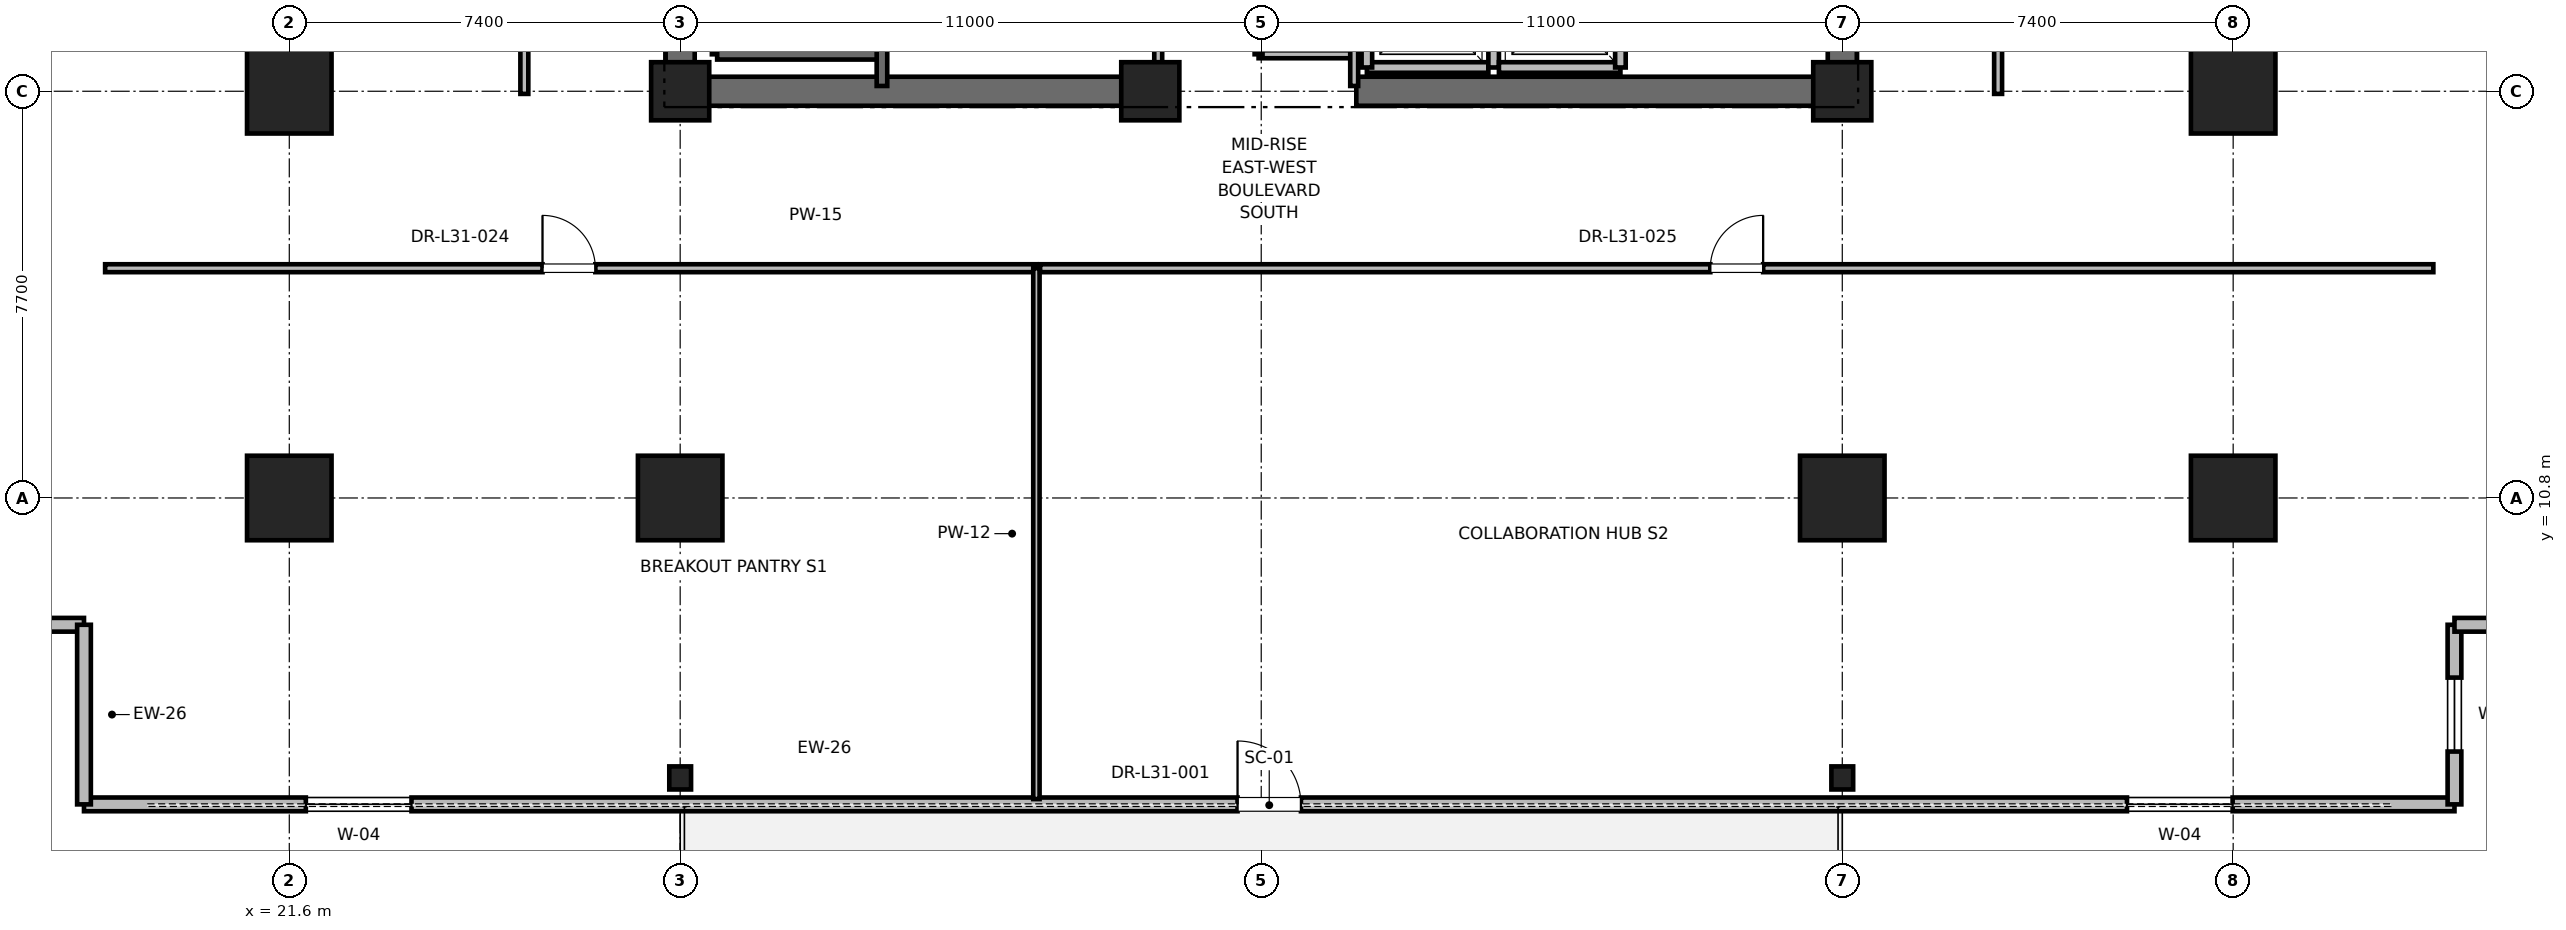
"""IFC4 building model, lengths in metres.
Left out: names, types, materials, properties, quantities, classifications, styles, units other than length and angle.
Written with IfcOpenShell. Run it as: python <this file> out.ifc"""

import sys

from ifc_helpers import new_model, si_unit, direction, frame, frame_2d, origin, origin_2d, place, context, subcontext, project, spatial, rectangle, i_section, extrude, element, fill, save


model = new_model("IFC4")
c1 = context("Model", 3, precision=1e-05, world=origin(), true_north=direction((0.0, 1.0)))
c2 = subcontext(c1, "Body", "Model", "MODEL_VIEW")
j1 = project(units=[si_unit("LENGTHUNIT", "METRE"), si_unit("PLANEANGLEUNIT", "RADIAN")], contexts=[c1])
p1 = place(None, origin())
s1 = spatial("IfcSite", under=j1, at=p1, CompositionType="ELEMENT")
p2 = place(p1, origin())
s2 = spatial("IfcBuilding", under=s1, at=p2, CompositionType="ELEMENT")
p3 = place(p2, frame((0.0, 0.0, 136.4)))
s3 = spatial("IfcBuildingStorey", under=s2, at=p3, CompositionType="ELEMENT", Elevation=136.4)
for number, where, z_axis, x_axis in (
    (1, (29.0, 10.8, 0.0), (0.0, 0.0, 1.0), (1.0, 0.0, 0.0)),
    (2, (51.0, 10.8, 0.0), (0.0, 0.0, 1.0), (1.0, 0.0, 0.0)),
    (3, (21.6, 18.5, 0.0), (0.0, 0.0, 1.0), (1.0, 0.0, 0.0)),
    (4, (58.4, 18.5, 0.0), (0.0, 0.0, 1.0), (1.0, 0.0, 0.0)),
    (5, (21.6, 10.8, 0.0), (0.0, 0.0, 1.0), (1.0, 0.0, 0.0)),
    (6, (58.4, 10.8, 0.0), (0.0, 0.0, 1.0), (1.0, 0.0, 0.0)),
):
    element("IfcColumn", number, at=place(p3, frame(where, z_axis=z_axis, x_axis=x_axis)), inside=s3, PredefinedType="COLUMN", context=c2, shape_type="SweptSolid", body=[
        extrude(rectangle(XDim=1.6, YDim=1.6, at=origin_2d()), origin(), (0.0, 0.0, 1.0), 4.0),
    ])
for number, where, z_axis, x_axis in (
    (7, (29.0, 5.5, 0.0), (0.0, 0.0, 1.0), (1.0, 0.0, 0.0)),
    (8, (51.0, 5.5, 0.0), (0.0, 0.0, 1.0), (1.0, 0.0, 0.0)),
):
    element("IfcColumn", number, at=place(p3, frame(where, z_axis=z_axis, x_axis=x_axis)), inside=s3, PredefinedType="COLUMN", context=c2, shape_type="SweptSolid", body=[
        extrude(i_section(OverallWidth=0.412, OverallDepth=0.437, WebThickness=0.036, FlangeThickness=0.058, FilletRadius=0.015, at=origin_2d()), origin(), (0.0, 0.0, 1.0), 4.0),
    ])
for number, where, z_axis, x_axis in (
    (9, (29.0, 18.5, 0.0), (0.0, 0.0, 1.0), (1.0, 0.0, 0.0)),
    (10, (51.0, 18.5, 0.0), (0.0, 0.0, 1.0), (1.0, 0.0, 0.0)),
    (11, (37.9, 18.5, 0.0), (0.0, 0.0, 1.0), (1.0, 0.0, 0.0)),
):
    element("IfcColumn", number, at=place(p3, frame(where, z_axis=z_axis, x_axis=x_axis)), inside=s3, PredefinedType="PILASTER", context=c2, shape_type="SweptSolid", body=[
        extrude(rectangle(XDim=1.1, YDim=1.1, at=origin_2d()), origin(), (0.0, 0.0, 1.0), 4.0),
    ])
for number, where, z_axis, x_axis in (
    (12, (29.0, 18.5, 0.0), (0.0, 0.0, 1.0), (1.0, 0.0, 0.0)),
    (13, (41.8, 18.5, 0.0), (0.0, 0.0, 1.0), (1.0, 0.0, 0.0)),
):
    element("IfcWall", number, at=place(p3, frame(where, z_axis=z_axis, x_axis=x_axis)), inside=s3, PredefinedType="SHEAR", context=c2, shape_type="SweptSolid", body=[
        extrude(rectangle(XDim=9.2, YDim=0.55, at=frame_2d((4.6, 0.0))), origin(), (0.0, 0.0, 1.0), 3.775),
    ])
p4 = place(p3, frame((29.0, 18.5, 0.0), z_axis=(0.0, 0.0, 1.0), x_axis=(0.0, 1.0, 0.0)))
e14 = element("IfcWall", 14, at=p4, inside=s3, PredefinedType="SHEAR", context=c2, shape_type="SweptSolid", body=[
    extrude(rectangle(XDim=8.8, YDim=0.55, at=frame_2d((4.4, 0.0))), origin(), (0.0, 0.0, 1.0), 3.775),
])
p5 = place(p3, frame((51.0, 18.5, 0.0), z_axis=(0.0, 0.0, 1.0), x_axis=(0.0, 1.0, 0.0)))
e15 = element("IfcWall", 15, at=p5, inside=s3, PredefinedType="SHEAR", context=c2, shape_type="SweptSolid", body=[
    extrude(rectangle(XDim=5.8, YDim=0.55, at=frame_2d((2.9, 0.0))), origin(), (0.0, 0.0, 1.0), 3.775),
])
p6 = place(p3, frame((17.714, 5.0, 0.0), z_axis=(0.0, 0.0, 1.0), x_axis=(1.0, 0.0, 0.0)))
e16 = element("IfcWall", 16, at=p6, inside=s3, PredefinedType="PARAPET", context=c2, shape_type="SweptSolid", body=[
    extrude(rectangle(XDim=44.876, YDim=0.26, at=frame_2d((22.438, 0.0))), origin(), (0.0, 0.0, 1.0), 2.97),
])
p7 = place(p6, frame((4.2, 0.0, 0.85)))
e17 = element("IfcOpeningElement", 17, at=p7, cuts=e16, PredefinedType="OPENING", context=c2, shape_type="SweptSolid", body=[
    extrude(rectangle(XDim=2.0, YDim=2.3, at=frame_2d((1.0, 1.15))), frame((0.0, 0.13, 0.0), z_axis=(0.0, -1.0, 0.0), x_axis=(1.0, 0.0, 0.0)), (0.0, 0.0, 1.0), 0.26),
])
p8 = place(p6, frame((21.838, 0.0, 0.0)))
e18 = element("IfcOpeningElement", 18, at=p8, cuts=e16, PredefinedType="OPENING", context=c2, shape_type="SweptSolid", body=[
    extrude(rectangle(XDim=1.2, YDim=2.2, at=frame_2d((0.6, 1.1))), frame((0.0, 0.13, 0.0), z_axis=(0.0, -1.0, 0.0), x_axis=(1.0, 0.0, 0.0)), (0.0, 0.0, 1.0), 0.26),
])
p9 = place(p6, frame((38.676, 0.0, 0.85)))
e19 = element("IfcOpeningElement", 19, at=p9, cuts=e16, PredefinedType="OPENING", context=c2, shape_type="SweptSolid", body=[
    extrude(rectangle(XDim=2.0, YDim=2.3, at=frame_2d((1.0, 1.15))), frame((0.0, 0.13, 0.0), z_axis=(0.0, -1.0, 0.0), x_axis=(1.0, 0.0, 0.0)), (0.0, 0.0, 1.0), 0.26),
])
p10 = place(p3, frame((13.914, 8.399, 0.0), z_axis=(0.0, 0.0, 1.0), x_axis=(1.0, 0.0, 0.0)))
e20 = element("IfcWall", 20, at=p10, inside=s3, PredefinedType="PARAPET", context=c2, shape_type="SweptSolid", body=[
    extrude(rectangle(XDim=3.8, YDim=0.26, at=frame_2d((1.9, 0.0))), origin(), (0.0, 0.0, 1.0), 3.775),
])
p11 = place(p10, frame((1.2, 0.0, 0.85)))
e21 = element("IfcOpeningElement", 21, at=p11, cuts=e20, PredefinedType="OPENING", context=c2, shape_type="SweptSolid", body=[
    extrude(rectangle(XDim=1.4, YDim=2.0, at=frame_2d((0.7, 1.0))), frame((0.0, 0.13, 0.0), z_axis=(0.0, -1.0, 0.0), x_axis=(1.0, 0.0, 0.0)), (0.0, 0.0, 1.0), 0.26),
])
p12 = place(p3, frame((17.714, 8.399, 0.0), z_axis=(0.0, 0.0, 1.0), x_axis=(0.0, -1.0, 0.0)))
e22 = element("IfcWall", 22, at=p12, inside=s3, PredefinedType="PARAPET", context=c2, shape_type="SweptSolid", body=[
    extrude(rectangle(XDim=3.4, YDim=0.26, at=frame_2d((1.7, 0.0))), origin(), (0.0, 0.0, 1.0), 3.775),
])
p13 = place(p3, frame((62.59, 5.0, 0.0), z_axis=(0.0, 0.0, 1.0), x_axis=(0.0, 1.0, 0.0)))
e23 = element("IfcWall", 23, at=p13, inside=s3, PredefinedType="PARAPET", context=c2, shape_type="SweptSolid", body=[
    extrude(rectangle(XDim=3.4, YDim=0.26, at=frame_2d((1.7, 0.0))), origin(), (0.0, 0.0, 1.0), 3.775),
])
p14 = place(p13, frame((1.0, 0.0, 0.85)))
e24 = element("IfcOpeningElement", 24, at=p14, cuts=e23, PredefinedType="OPENING", context=c2, shape_type="SweptSolid", body=[
    extrude(rectangle(XDim=1.4, YDim=2.0, at=frame_2d((0.7, 1.0))), frame((0.0, 0.13, 0.0), z_axis=(0.0, -1.0, 0.0), x_axis=(1.0, 0.0, 0.0)), (0.0, 0.0, 1.0), 0.26),
])
p15 = place(p3, frame((62.59, 8.399, 0.0), z_axis=(0.0, 0.0, 1.0), x_axis=(1.0, 0.0, 0.0)))
e25 = element("IfcWall", 25, at=p15, inside=s3, PredefinedType="PARAPET", context=c2, shape_type="SweptSolid", body=[
    extrude(rectangle(XDim=3.8, YDim=0.26, at=frame_2d((1.9, 0.0))), origin(), (0.0, 0.0, 1.0), 3.775),
])
p16 = place(p3, frame((29.7, 19.2, 0.0), z_axis=(0.0, 0.0, 1.0), x_axis=(0.0, 1.0, 0.0)))
e26 = element("IfcWall", 26, at=p16, inside=s3, PredefinedType="SOLIDWALL", context=c2, shape_type="SweptSolid", body=[
    extrude(rectangle(XDim=8.15, YDim=0.2, at=frame_2d((4.075, 0.0))), origin(), (0.0, 0.0, 1.0), 3.775),
])
p17 = place(p3, frame((29.7, 19.2, 0.0), z_axis=(0.0, 0.0, 1.0), x_axis=(1.0, 0.0, 0.0)))
e27 = element("IfcWall", 27, at=p17, inside=s3, PredefinedType="SOLIDWALL", context=c2, shape_type="SweptSolid", body=[
    extrude(rectangle(XDim=3.12, YDim=0.2, at=frame_2d((1.56, 0.0))), origin(), (0.0, 0.0, 1.0), 3.775),
])
p18 = place(p3, frame((32.82, 18.6, 0.0), z_axis=(0.0, 0.0, 1.0), x_axis=(0.0, 1.0, 0.0)))
e28 = element("IfcWall", 28, at=p18, inside=s3, PredefinedType="SOLIDWALL", context=c2, shape_type="SweptSolid", body=[
    extrude(rectangle(XDim=8.78, YDim=0.2, at=frame_2d((4.39, 0.0))), origin(), (0.0, 0.0, 1.0), 3.775),
])
p19 = place(p3, frame((42.0, 18.95, 0.0), z_axis=(0.0, 0.0, 1.0), x_axis=(1.0, 0.0, 0.0)))
e29 = element("IfcWall", 29, at=p19, inside=s3, PredefinedType="SOLIDWALL", context=c2, shape_type="SweptSolid", body=[
    extrude(rectangle(XDim=2.3, YDim=0.2, at=frame_2d((1.15, 0.0))), origin(), (0.0, 0.0, 1.0), 2.755),
])
p20 = place(p3, frame((42.0, 21.55, 0.0), z_axis=(0.0, 0.0, 1.0), x_axis=(0.0, -1.0, 0.0)))
e30 = element("IfcWall", 30, at=p20, inside=s3, PredefinedType="SOLIDWALL", context=c2, shape_type="SweptSolid", body=[
    extrude(rectangle(XDim=2.6, YDim=0.2, at=frame_2d((1.3, 0.0))), origin(), (0.0, 0.0, 1.0), 2.755),
])
p21 = place(p3, frame((44.4, 18.95, 0.0), z_axis=(0.0, 0.0, 1.0), x_axis=(0.0, 1.0, 0.0)))
e31 = element("IfcWall", 31, at=p21, inside=s3, PredefinedType="SOLIDWALL", context=c2, shape_type="SweptSolid", body=[
    extrude(rectangle(XDim=2.6, YDim=0.2, at=frame_2d((1.3, 0.0))), origin(), (0.0, 0.0, 1.0), 3.775),
])
p22 = place(p3, frame((44.5, 18.95, 0.0), z_axis=(0.0, 0.0, 1.0), x_axis=(1.0, 0.0, 0.0)))
e32 = element("IfcWall", 32, at=p22, inside=s3, PredefinedType="SOLIDWALL", context=c2, shape_type="SweptSolid", body=[
    extrude(rectangle(XDim=2.3, YDim=0.2, at=frame_2d((1.15, 0.0))), origin(), (0.0, 0.0, 1.0), 3.775),
])
p23 = place(p3, frame((46.8, 18.95, 0.0), z_axis=(0.0, 0.0, 1.0), x_axis=(0.0, 1.0, 0.0)))
e33 = element("IfcWall", 33, at=p23, inside=s3, PredefinedType="SOLIDWALL", context=c2, shape_type="SweptSolid", body=[
    extrude(rectangle(XDim=2.6, YDim=0.2, at=frame_2d((1.3, 0.0))), origin(), (0.0, 0.0, 1.0), 3.775),
])
p24 = place(p3, frame((39.95, 19.2, 0.0), z_axis=(0.0, 0.0, 1.0), x_axis=(1.0, 0.0, 0.0)))
e34 = element("IfcWall", 34, at=p24, inside=s3, PredefinedType="PARTITIONING", context=c2, shape_type="SweptSolid", body=[
    extrude(rectangle(XDim=1.81, YDim=0.15, at=frame_2d((0.905, 0.0))), origin(), (0.0, 0.0, 1.0), 2.85),
])
p25 = place(p3, frame((41.76, 18.6, 0.0), z_axis=(0.0, 0.0, 1.0), x_axis=(0.0, 1.0, 0.0)))
e35 = element("IfcWall", 35, at=p25, inside=s3, PredefinedType="PARTITIONING", context=c2, shape_type="SweptSolid", body=[
    extrude(rectangle(XDim=3.6, YDim=0.15, at=frame_2d((1.8, 0.0))), origin(), (0.0, 0.0, 1.0), 2.755),
])
p26 = place(p3, frame((39.95, 19.2, 0.0), z_axis=(0.0, 0.0, 1.0), x_axis=(0.0, 1.0, 0.0)))
e36 = element("IfcWall", 36, at=p26, inside=s3, PredefinedType="PARTITIONING", context=c2, shape_type="SweptSolid", body=[
    extrude(rectangle(XDim=3.0, YDim=0.15, at=frame_2d((1.5, 0.0))), origin(), (0.0, 0.0, 1.0), 2.85),
])
p27 = place(p26, frame((1.05, 0.0, 0.0)))
e37 = element("IfcOpeningElement", 37, at=p27, cuts=e36, PredefinedType="OPENING", context=c2, shape_type="SweptSolid", body=[
    extrude(rectangle(XDim=0.9, YDim=2.1, at=frame_2d((0.45, 1.05))), frame((0.0, 0.075, 0.0), z_axis=(0.0, -1.0, 0.0), x_axis=(1.0, 0.0, 0.0)), (0.0, 0.0, 1.0), 0.15),
])
p28 = place(p3, frame((38.05, 18.6, 0.0), z_axis=(0.0, 0.0, 1.0), x_axis=(0.0, 1.0, 0.0)))
e38 = element("IfcWall", 38, at=p28, inside=s3, PredefinedType="PARTITIONING", context=c2, shape_type="SweptSolid", body=[
    extrude(rectangle(XDim=3.06, YDim=0.15, at=frame_2d((1.53, 0.0))), origin(), (0.0, 0.0, 1.0), 2.755),
])
p29 = place(p28, frame((1.03, 0.0, 0.0)))
e39 = element("IfcOpeningElement", 39, at=p29, cuts=e38, PredefinedType="OPENING", context=c2, shape_type="SweptSolid", body=[
    extrude(rectangle(XDim=1.0, YDim=2.15, at=frame_2d((0.5, 1.075))), frame((0.0, 0.075, 0.0), z_axis=(0.0, -1.0, 0.0), x_axis=(1.0, 0.0, 0.0)), (0.0, 0.0, 1.0), 0.15),
])
p30 = place(p3, frame((18.114, 15.15, 0.0), z_axis=(0.0, 0.0, 1.0), x_axis=(1.0, 0.0, 0.0)))
e40 = element("IfcWall", 40, at=p30, inside=s3, PredefinedType="PARTITIONING", context=c2, shape_type="SweptSolid", body=[
    extrude(rectangle(XDim=17.63, YDim=0.15, at=frame_2d((8.815, 0.0))), origin(), (0.0, 0.0, 1.0), 2.85),
])
p31 = place(p30, frame((8.28, 0.0, 0.0)))
e41 = element("IfcOpeningElement", 41, at=p31, cuts=e40, PredefinedType="OPENING", context=c2, shape_type="SweptSolid", body=[
    extrude(rectangle(XDim=1.0, YDim=2.15, at=frame_2d((0.5, 1.075))), frame((0.0, 0.075, 0.0), z_axis=(0.0, -1.0, 0.0), x_axis=(1.0, 0.0, 0.0)), (0.0, 0.0, 1.0), 0.15),
])
p32 = place(p3, frame((35.744, 5.1, 0.0), z_axis=(0.0, 0.0, 1.0), x_axis=(0.0, 1.0, 0.0)))
e42 = element("IfcWall", 42, at=p32, inside=s3, PredefinedType="PARTITIONING", context=c2, shape_type="SweptSolid", body=[
    extrude(rectangle(XDim=10.05, YDim=0.12, at=frame_2d((5.025, 0.0))), origin(), (0.0, 0.0, 1.0), 2.405),
])
p33 = place(p3, frame((35.814, 15.15, 0.0), z_axis=(0.0, 0.0, 1.0), x_axis=(1.0, 0.0, 0.0)))
e43 = element("IfcWall", 43, at=p33, inside=s3, PredefinedType="PARTITIONING", context=c2, shape_type="SweptSolid", body=[
    extrude(rectangle(XDim=26.376, YDim=0.15, at=frame_2d((13.188, 0.0))), origin(), (0.0, 0.0, 1.0), 2.85),
])
p34 = place(p33, frame((12.688, 0.0, 0.0)))
e44 = element("IfcOpeningElement", 44, at=p34, cuts=e43, PredefinedType="OPENING", context=c2, shape_type="SweptSolid", body=[
    extrude(rectangle(XDim=1.0, YDim=2.15, at=frame_2d((0.5, 1.075))), frame((0.0, 0.075, 0.0), z_axis=(0.0, -1.0, 0.0), x_axis=(1.0, 0.0, 0.0)), (0.0, 0.0, 1.0), 0.15),
])
p35 = place(p3, frame((26.05, 18.45, 0.0), z_axis=(0.0, 0.0, 1.0), x_axis=(0.0, 1.0, 0.0)))
e45 = element("IfcWall", 45, at=p35, inside=s3, PredefinedType="PARTITIONING", context=c2, shape_type="SweptSolid", body=[
    extrude(rectangle(XDim=18.1, YDim=0.15, at=frame_2d((9.05, 0.0))), origin(), (0.0, 0.0, 1.0), 2.85),
])
p36 = place(p35, frame((8.55, 0.0, 0.0)))
e46 = element("IfcOpeningElement", 46, at=p36, cuts=e45, PredefinedType="OPENING", context=c2, shape_type="SweptSolid", body=[
    extrude(rectangle(XDim=1.0, YDim=2.15, at=frame_2d((0.5, 1.075))), frame((0.0, 0.075, 0.0), z_axis=(0.0, -1.0, 0.0), x_axis=(1.0, 0.0, 0.0)), (0.0, 0.0, 1.0), 0.15),
])
p37 = place(p3, frame((53.95, 18.45, 0.0), z_axis=(0.0, 0.0, 1.0), x_axis=(0.0, 1.0, 0.0)))
e47 = element("IfcWall", 47, at=p37, inside=s3, PredefinedType="PARTITIONING", context=c2, shape_type="SweptSolid", body=[
    extrude(rectangle(XDim=6.154, YDim=0.15, at=frame_2d((3.077, 0.0))), origin(), (0.0, 0.0, 1.0), 2.85),
])
p38 = place(p37, frame((2.617, 0.0, 0.0)))
e48 = element("IfcOpeningElement", 48, at=p38, cuts=e47, PredefinedType="OPENING", context=c2, shape_type="SweptSolid", body=[
    extrude(rectangle(XDim=1.0, YDim=2.15, at=frame_2d((0.5, 1.075))), frame((0.0, 0.075, 0.0), z_axis=(0.0, -1.0, 0.0), x_axis=(1.0, 0.0, 0.0)), (0.0, 0.0, 1.0), 0.15),
])
p39 = place(p7, origin())
e49 = element("IfcWindow", 49, at=p39, inside=s3, PartitioningType="SINGLE_PANEL", PredefinedType="WINDOW", context=c2, shape_type="SweptSolid", body=[
    extrude(rectangle(XDim=2.0, YDim=2.3, at=frame_2d((1.0, 1.15))), frame((0.0, 0.03, 0.0), z_axis=(0.0, -1.0, 0.0), x_axis=(1.0, 0.0, 0.0)), (0.0, 0.0, 1.0), 0.06),
])
fill(e17, e49)
p40 = place(p8, origin())
e50 = element("IfcDoor", 50, at=p40, inside=s3, OperationType="SINGLE_SWING_LEFT", PredefinedType="DOOR", context=c2, shape_type="SweptSolid", body=[
    extrude(rectangle(XDim=1.2, YDim=2.2, at=frame_2d((0.6, 1.1))), frame((0.0, 0.025, 0.0), z_axis=(0.0, -1.0, 0.0), x_axis=(1.0, 0.0, 0.0)), (0.0, 0.0, 1.0), 0.05),
])
fill(e18, e50)
p41 = place(p9, origin())
e51 = element("IfcWindow", 51, at=p41, inside=s3, PartitioningType="SINGLE_PANEL", PredefinedType="WINDOW", context=c2, shape_type="SweptSolid", body=[
    extrude(rectangle(XDim=2.0, YDim=2.3, at=frame_2d((1.0, 1.15))), frame((0.0, 0.03, 0.0), z_axis=(0.0, -1.0, 0.0), x_axis=(1.0, 0.0, 0.0)), (0.0, 0.0, 1.0), 0.06),
])
fill(e19, e51)
p42 = place(p14, origin())
e52 = element("IfcWindow", 52, at=p42, inside=s3, PartitioningType="SINGLE_PANEL", PredefinedType="WINDOW", context=c2, shape_type="SweptSolid", body=[
    extrude(rectangle(XDim=1.4, YDim=2.0, at=frame_2d((0.7, 1.0))), frame((0.0, 0.03, 0.0), z_axis=(0.0, -1.0, 0.0), x_axis=(1.0, 0.0, 0.0)), (0.0, 0.0, 1.0), 0.06),
])
fill(e24, e52)
p43 = place(p31, origin())
e53 = element("IfcDoor", 53, at=p43, inside=s3, OperationType="SINGLE_SWING_LEFT", PredefinedType="DOOR", context=c2, shape_type="SweptSolid", body=[
    extrude(rectangle(XDim=1.0, YDim=2.15, at=frame_2d((0.5, 1.075))), frame((0.0, 0.025, 0.0), z_axis=(0.0, -1.0, 0.0), x_axis=(1.0, 0.0, 0.0)), (0.0, 0.0, 1.0), 0.05),
])
fill(e41, e53)
p44 = place(p34, origin())
e54 = element("IfcDoor", 54, at=p44, inside=s3, OperationType="SINGLE_SWING_RIGHT", PredefinedType="DOOR", context=c2, shape_type="SweptSolid", body=[
    extrude(rectangle(XDim=1.0, YDim=2.15, at=frame_2d((0.5, 1.075))), frame((0.0, 0.025, 0.0), z_axis=(0.0, -1.0, 0.0), x_axis=(1.0, 0.0, 0.0)), (0.0, 0.0, 1.0), 0.05),
])
fill(e44, e54)
save(model, sys.argv[1])
